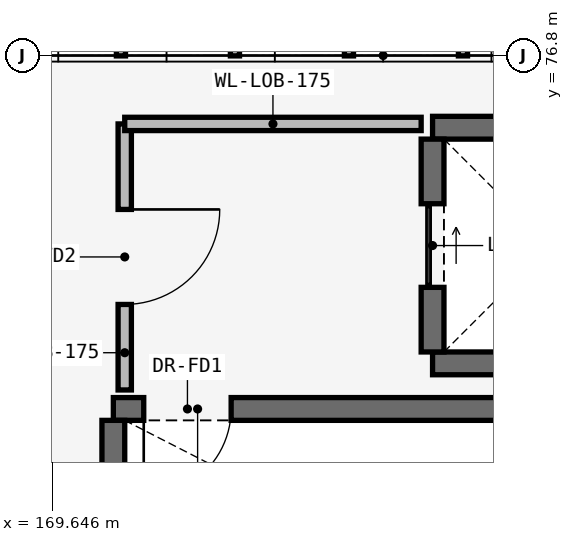
"""IFC4 building model, lengths in metres.
Left out: names, types, materials, properties, quantities, classifications, styles, units other than length and angle.
Written with IfcOpenShell. Run it as: python <this file> out.ifc"""

import sys

from ifc_helpers import new_model, si_unit, direction, frame, frame_2d, origin, place, context, subcontext, project, spatial, rectangle, extrude, element, fill, save


model = new_model("IFC4")
c1 = context("Model", 3, precision=1e-05, world=origin(), true_north=direction((0.0, 1.0)))
c2 = subcontext(c1, "Body", "Model", "MODEL_VIEW")
j1 = project(units=[si_unit("LENGTHUNIT", "METRE"), si_unit("PLANEANGLEUNIT", "RADIAN")], contexts=[c1])
p1 = place(None, origin())
s1 = spatial("IfcSite", under=j1, at=p1, CompositionType="ELEMENT")
p2 = place(p1, origin())
s2 = spatial("IfcBuilding", under=s1, at=p2, CompositionType="ELEMENT")
p3 = place(p2, frame((0.0, 0.0, 18.6)))
s3 = spatial("IfcBuildingStorey", under=s2, at=p3, CompositionType="ELEMENT", Elevation=18.6)
p4 = place(p3, frame((170.45, 72.15, 0.0), z_axis=(0.0, 0.0, 1.0), x_axis=(1.0, 0.0, 0.0)))
e1 = element("IfcWall", 1, at=p4, inside=s3, PredefinedType="SHEAR", context=c2, shape_type="SweptSolid", body=[
    extrude(rectangle(XDim=7.92, YDim=0.3, at=frame_2d((3.96, 0.0))), origin(), (0.0, 0.0, 1.0), 3.98),
])
p5 = place(p4, frame((0.4, 0.0, 0.0)))
e2 = element("IfcOpeningElement", 2, at=p5, cuts=e1, PredefinedType="OPENING", context=c2, shape_type="SweptSolid", body=[
    extrude(rectangle(XDim=1.15, YDim=2.15, at=frame_2d((0.575, 1.075))), frame((0.0, 0.165, 0.0), z_axis=(0.0, -1.0, 0.0), x_axis=(1.0, 0.0, 0.0)), (0.0, 0.0, 1.0), 0.33),
])
p6 = place(p3, frame((170.45, 68.1, 0.0), z_axis=(0.0, 0.0, 1.0), x_axis=(0.0, 1.0, 0.0)))
e3 = element("IfcWall", 3, at=p6, inside=s3, PredefinedType="SHEAR", context=c2, shape_type="SweptSolid", body=[
    extrude(rectangle(XDim=3.9, YDim=0.3, at=frame_2d((1.95, 0.0))), origin(), (0.0, 0.0, 1.0), 3.98),
])
for number, where, z_axis, x_axis in (
    (4, (174.65, 72.75, 0.0), (0.0, 0.0, 1.0), (1.0, 0.0, 0.0)),
    (5, (174.65, 75.85, 0.0), (0.0, 0.0, 1.0), (1.0, 0.0, 0.0)),
):
    element("IfcWall", number, at=place(p3, frame(where, z_axis=z_axis, x_axis=x_axis)), inside=s3, PredefinedType="SHEAR", context=c2, shape_type="SweptSolid", body=[
        extrude(rectangle(XDim=3.1, YDim=0.3, at=frame_2d((1.55, 0.0))), origin(), (0.0, 0.0, 1.0), 3.98),
    ])
p7 = place(p3, frame((174.65, 72.9, 0.0), z_axis=(0.0, 0.0, 1.0), x_axis=(0.0, 1.0, 0.0)))
e6 = element("IfcWall", 6, at=p7, inside=s3, PredefinedType="SHEAR", context=c2, shape_type="SweptSolid", body=[
    extrude(rectangle(XDim=2.8, YDim=0.3, at=frame_2d((1.4, 0.0))), origin(), (0.0, 0.0, 1.0), 3.98),
])
p8 = place(p7, frame((0.85, 0.0, 0.0)))
e7 = element("IfcOpeningElement", 7, at=p8, cuts=e6, PredefinedType="OPENING", context=c2, shape_type="SweptSolid", body=[
    extrude(rectangle(XDim=1.1, YDim=2.15, at=frame_2d((0.55, 1.075))), frame((0.0, 0.165, 0.0), z_axis=(0.0, -1.0, 0.0), x_axis=(1.0, 0.0, 0.0)), (0.0, 0.0, 1.0), 0.33),
])
p9 = place(p3, frame((170.6, 72.4, 0.0), z_axis=(0.0, 0.0, 1.0), x_axis=(0.0, 1.0, 0.0)))
e8 = element("IfcWall", 8, at=p9, inside=s3, PredefinedType="PARTITIONING", context=c2, shape_type="SweptSolid", body=[
    extrude(rectangle(XDim=3.5, YDim=0.175, at=frame_2d((1.75, 0.0))), origin(), (0.0, 0.0, 1.0), 3.98),
])
p10 = place(p9, frame((1.125, 0.0, 0.0)))
e9 = element("IfcOpeningElement", 9, at=p10, cuts=e8, PredefinedType="OPENING", context=c2, shape_type="SweptSolid", body=[
    extrude(rectangle(XDim=1.25, YDim=2.2, at=frame_2d((0.625, 1.1))), frame((0.0, 0.103, 0.0), z_axis=(0.0, -1.0, 0.0), x_axis=(1.0, 0.0, 0.0)), (0.0, 0.0, 1.0), 0.205),
])
p11 = place(p3, frame((170.6, 75.9, 0.0), z_axis=(0.0, 0.0, 1.0), x_axis=(1.0, 0.0, 0.0)))
e10 = element("IfcWall", 10, at=p11, inside=s3, PredefinedType="PARTITIONING", context=c2, shape_type="SweptSolid", body=[
    extrude(rectangle(XDim=3.9, YDim=0.175, at=frame_2d((1.95, 0.0))), origin(), (0.0, 0.0, 1.0), 3.98),
])
p12 = place(p5, frame((1.15, 0.0, 0.0), z_axis=(0.0, 0.0, 1.0), x_axis=(-1.0, 0.0, 0.0)))
e11 = element("IfcDoor", 11, at=p12, inside=s3, OperationType="SINGLE_SWING_LEFT", PredefinedType="DOOR", context=c2, shape_type="SweptSolid", body=[
    extrude(rectangle(XDim=1.15, YDim=2.15, at=frame_2d((0.575, 1.075))), frame((0.0, 0.025, 0.0), z_axis=(0.0, -1.0, 0.0), x_axis=(1.0, 0.0, 0.0)), (0.0, 0.0, 1.0), 0.05),
])
fill(e2, e11)
p13 = place(p8, origin())
e12 = element("IfcDoor", 12, at=p13, inside=s3, OperationType="SLIDING_TO_LEFT", PredefinedType="DOOR", context=c2, shape_type="SweptSolid", body=[
    extrude(rectangle(XDim=1.1, YDim=2.15, at=frame_2d((0.55, 1.075))), frame((0.0, 0.025, 0.0), z_axis=(0.0, -1.0, 0.0), x_axis=(1.0, 0.0, 0.0)), (0.0, 0.0, 1.0), 0.05),
])
fill(e7, e12)
p14 = place(p10, frame((1.25, 0.0, 0.0), z_axis=(0.0, 0.0, 1.0), x_axis=(-1.0, 0.0, 0.0)))
e13 = element("IfcDoor", 13, at=p14, inside=s3, OperationType="SINGLE_SWING_RIGHT", PredefinedType="DOOR", context=c2, shape_type="SweptSolid", body=[
    extrude(rectangle(XDim=1.25, YDim=2.2, at=frame_2d((0.625, 1.1))), frame((0.0, 0.025, 0.0), z_axis=(0.0, -1.0, 0.0), x_axis=(1.0, 0.0, 0.0)), (0.0, 0.0, 1.0), 0.05),
])
fill(e9, e13)
save(model, sys.argv[1])
